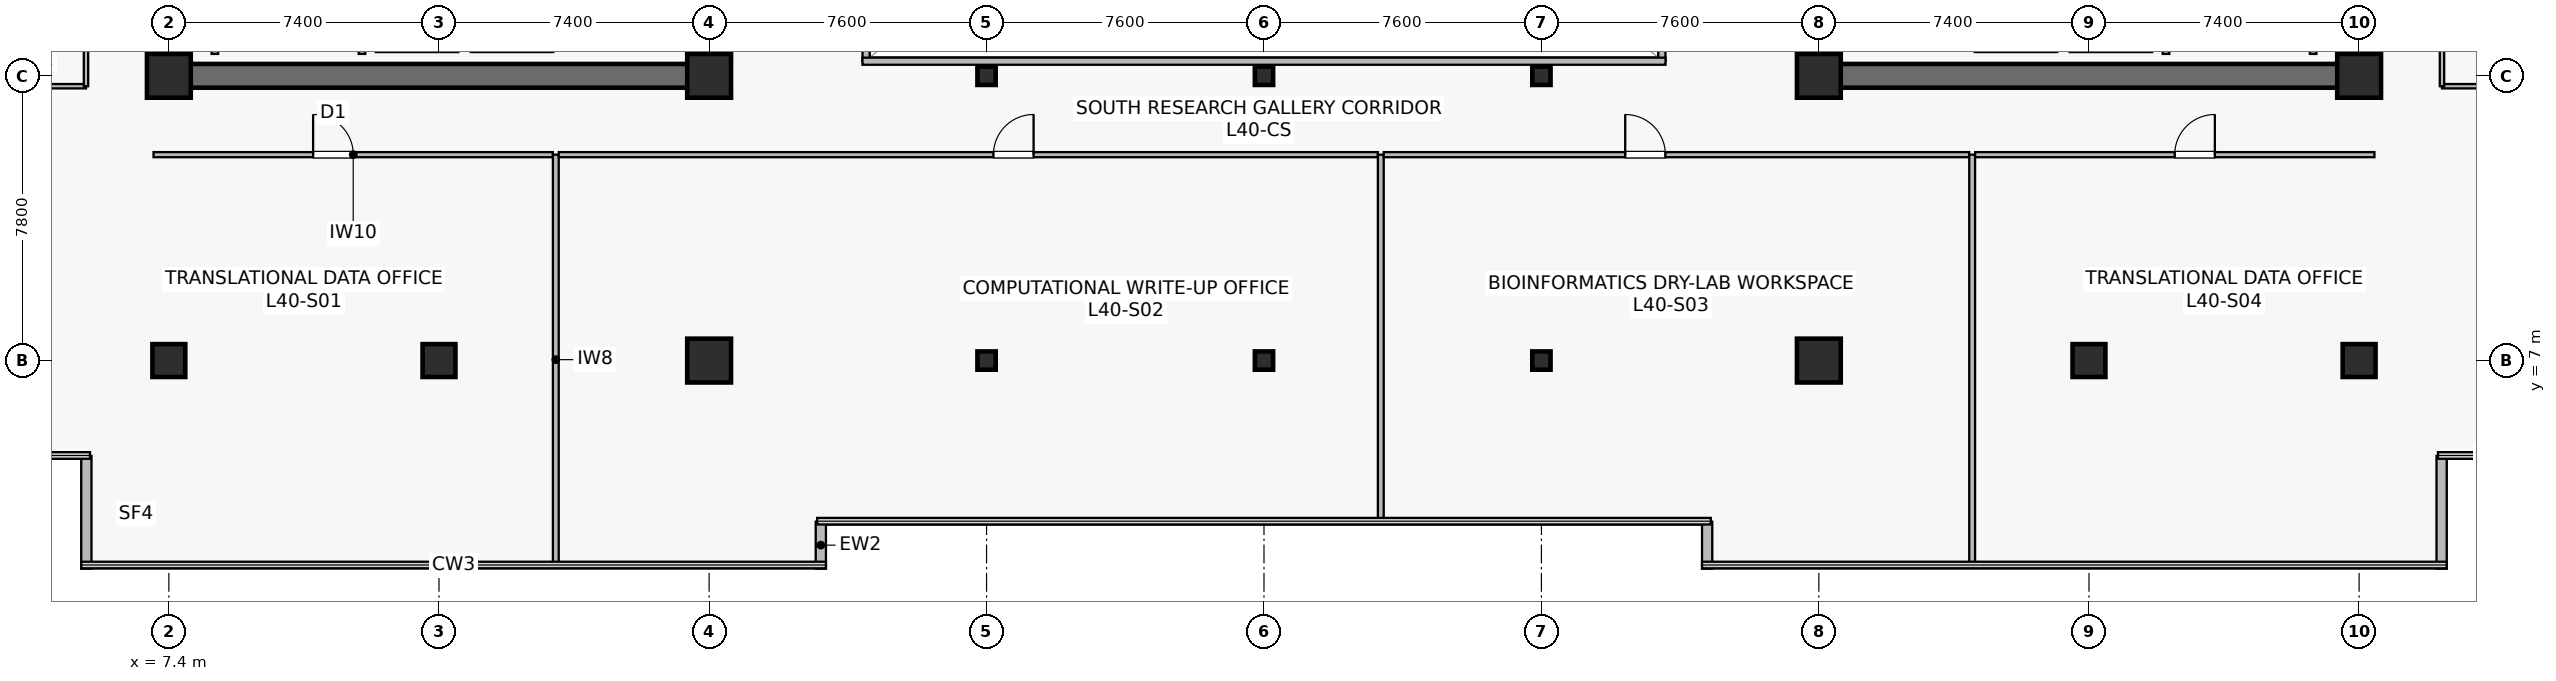
"""IFC4 building model, lengths in metres.
Left out: names, types, materials, properties, quantities, classifications, styles, units other than length and angle.
Written with IfcOpenShell. Run it as: python <this file> out.ifc"""

import sys

from ifc_helpers import new_model, si_unit, direction, frame, frame_2d, origin, origin_2d, place, context, subcontext, project, spatial, rectangle, hollow_rectangle, extrude, source, transform, mapped, element, fill, save


model = new_model("IFC4")
c1 = context("Model", 3, precision=1e-05, world=origin(), true_north=direction((0.0, 1.0)))
c2 = subcontext(c1, "Body", "Model", "MODEL_VIEW")
j1 = project(units=[si_unit("LENGTHUNIT", "METRE"), si_unit("PLANEANGLEUNIT", "RADIAN")], contexts=[c1])
p1 = place(None, origin())
s1 = spatial("IfcSite", under=j1, at=p1, CompositionType="ELEMENT")
p2 = place(p1, origin())
s2 = spatial("IfcBuilding", under=s1, at=p2, CompositionType="ELEMENT")
p3 = place(p2, frame((0.0, 0.0, 166.6)))
s3 = spatial("IfcBuildingStorey", under=s2, at=p3, CompositionType="ELEMENT", Elevation=166.6)
p4 = place(p3, frame((7.075, 14.8, 0.0), z_axis=(0.0, 0.0, 1.0), x_axis=(1.0, 0.0, 0.0)))
e1 = element("IfcWall", 1, at=p4, inside=s3, PredefinedType="SHEAR", context=c2, shape_type="SweptSolid", body=[
    extrude(rectangle(XDim=15.45, YDim=0.65, at=frame_2d((7.725, 0.0))), origin(), (0.0, 0.0, 1.0), 3.79),
])
p5 = place(p3, frame((7.4, 15.125, 0.0), z_axis=(0.0, 0.0, 1.0), x_axis=(0.0, 1.0, 0.0)))
e2 = element("IfcWall", 2, at=p5, inside=s3, PredefinedType="SHEAR", context=c2, shape_type="SweptSolid", body=[
    extrude(rectangle(XDim=18.35, YDim=0.65, at=frame_2d((9.175, 0.0))), origin(), (0.0, 0.0, 1.0), 3.79),
])
p6 = place(p3, frame((22.2, 15.125, 0.0), z_axis=(0.0, 0.0, 1.0), x_axis=(0.0, 1.0, 0.0)))
e3 = element("IfcWall", 3, at=p6, inside=s3, PredefinedType="SHEAR", context=c2, shape_type="SweptSolid", body=[
    extrude(rectangle(XDim=18.35, YDim=0.65, at=frame_2d((9.175, 0.0))), origin(), (0.0, 0.0, 1.0), 3.79),
])
p7 = place(p6, frame((3.425, 0.0, 0.0)))
e4 = element("IfcOpeningElement", 4, at=p7, cuts=e3, PredefinedType="OPENING", context=c2, shape_type="SweptSolid", body=[
    extrude(rectangle(XDim=1.42, YDim=2.2, at=frame_2d((0.71, 1.1))), frame((0.0, 0.335, 0.0), z_axis=(0.0, -1.0, 0.0), x_axis=(1.0, 0.0, 0.0)), (0.0, 0.0, 1.0), 0.67),
])
p8 = place(p3, frame((52.275, 14.8, 0.0), z_axis=(0.0, 0.0, 1.0), x_axis=(1.0, 0.0, 0.0)))
e5 = element("IfcWall", 5, at=p8, inside=s3, PredefinedType="SHEAR", context=c2, shape_type="SweptSolid", body=[
    extrude(rectangle(XDim=15.45, YDim=0.65, at=frame_2d((7.725, 0.0))), origin(), (0.0, 0.0, 1.0), 3.79),
])
p9 = place(p3, frame((52.6, 15.125, 0.0), z_axis=(0.0, 0.0, 1.0), x_axis=(0.0, 1.0, 0.0)))
e6 = element("IfcWall", 6, at=p9, inside=s3, PredefinedType="SHEAR", context=c2, shape_type="SweptSolid", body=[
    extrude(rectangle(XDim=18.35, YDim=0.65, at=frame_2d((9.175, 0.0))), origin(), (0.0, 0.0, 1.0), 3.79),
])
p10 = place(p9, frame((3.425, 0.0, 0.0)))
e7 = element("IfcOpeningElement", 7, at=p10, cuts=e6, PredefinedType="OPENING", context=c2, shape_type="SweptSolid", body=[
    extrude(rectangle(XDim=1.42, YDim=2.2, at=frame_2d((0.71, 1.1))), frame((0.0, 0.335, 0.0), z_axis=(0.0, -1.0, 0.0), x_axis=(1.0, 0.0, 0.0)), (0.0, 0.0, 1.0), 0.67),
])
p11 = place(p3, frame((67.4, 15.125, 0.0), z_axis=(0.0, 0.0, 1.0), x_axis=(0.0, 1.0, 0.0)))
e8 = element("IfcWall", 8, at=p11, inside=s3, PredefinedType="SHEAR", context=c2, shape_type="SweptSolid", body=[
    extrude(rectangle(XDim=18.35, YDim=0.65, at=frame_2d((9.175, 0.0))), origin(), (0.0, 0.0, 1.0), 3.79),
])
m1 = source(origin(), c2, "Body", "SweptSolid", [
    extrude(rectangle(XDim=0.9, YDim=0.9, at=origin_2d()), origin(), (0.0, 0.0, 1.0), 4.1),
])
p12 = place(p3, frame((14.8, 7.0, 0.0), z_axis=(0.0, 0.0, 1.0), x_axis=(1.0, 0.0, 0.0)))
e9 = element("IfcColumn", 9, at=p12, inside=s3, PredefinedType="COLUMN", context=c2, shape_type="MappedRepresentation", body=[
    mapped(m1, transform((0.0, 0.0, 0.0), scale=1.0)),
])
m2 = source(origin(), c2, "Body", "SweptSolid", [
    extrude(rectangle(XDim=1.2, YDim=1.2, at=origin_2d()), origin(), (0.0, 0.0, 1.0), 4.1),
])
for number, where, z_axis, x_axis in (
    (10, (22.2, 7.0, 0.0), (0.0, 0.0, 1.0), (1.0, 0.0, 0.0)),
    (11, (7.4, 14.8, 0.0), (0.0, 0.0, 1.0), (1.0, 0.0, 0.0)),
    (12, (22.2, 14.8, 0.0), (0.0, 0.0, 1.0), (1.0, 0.0, 0.0)),
    (13, (52.6, 7.0, 0.0), (0.0, 0.0, 1.0), (1.0, 0.0, 0.0)),
):
    element("IfcColumn", number, at=place(p3, frame(where, z_axis=z_axis, x_axis=x_axis)), inside=s3, PredefinedType="COLUMN", context=c2, shape_type="MappedRepresentation", body=[
        mapped(m2, transform((0.0, 0.0, 0.0), scale=1.0)),
    ])
p13 = place(p3, frame((60.0, 7.0, 0.0), z_axis=(0.0, 0.0, 1.0), x_axis=(1.0, 0.0, 0.0)))
e14 = element("IfcColumn", 14, at=p13, inside=s3, PredefinedType="COLUMN", context=c2, shape_type="MappedRepresentation", body=[
    mapped(m1, transform((0.0, 0.0, 0.0), scale=1.0)),
])
for number, where, z_axis, x_axis in (
    (15, (52.6, 14.8, 0.0), (0.0, 0.0, 1.0), (1.0, 0.0, 0.0)),
    (16, (67.4, 14.8, 0.0), (0.0, 0.0, 1.0), (1.0, 0.0, 0.0)),
):
    element("IfcColumn", number, at=place(p3, frame(where, z_axis=z_axis, x_axis=x_axis)), inside=s3, PredefinedType="COLUMN", context=c2, shape_type="MappedRepresentation", body=[
        mapped(m2, transform((0.0, 0.0, 0.0), scale=1.0)),
    ])
for number, where, z_axis, x_axis in (
    (17, (7.4, 7.0, 0.0), (0.0, 0.0, 1.0), (1.0, 0.0, 0.0)),
    (18, (67.4, 7.0, 0.0), (0.0, 0.0, 1.0), (1.0, 0.0, 0.0)),
):
    element("IfcColumn", number, at=place(p3, frame(where, z_axis=z_axis, x_axis=x_axis)), inside=s3, PredefinedType="COLUMN", context=c2, shape_type="MappedRepresentation", body=[
        mapped(m1, transform((0.0, 0.0, 0.0), scale=1.0)),
    ])
m3 = source(origin(), c2, "Body", "SweptSolid", [
    extrude(hollow_rectangle(XDim=0.5, YDim=0.5, WallThickness=0.022, at=origin_2d()), origin(), (0.0, 0.0, 1.0), 4.1),
])
for number, where, z_axis, x_axis in (
    (19, (29.8, 7.0, 0.0), (0.0, 0.0, 1.0), (1.0, 0.0, 0.0)),
    (20, (29.8, 14.8, 0.0), (0.0, 0.0, 1.0), (1.0, 0.0, 0.0)),
    (21, (37.4, 7.0, 0.0), (0.0, 0.0, 1.0), (1.0, 0.0, 0.0)),
    (22, (37.4, 14.8, 0.0), (0.0, 0.0, 1.0), (1.0, 0.0, 0.0)),
    (23, (45.0, 7.0, 0.0), (0.0, 0.0, 1.0), (1.0, 0.0, 0.0)),
    (24, (45.0, 14.8, 0.0), (0.0, 0.0, 1.0), (1.0, 0.0, 0.0)),
):
    element("IfcColumn", number, at=place(p3, frame(where, z_axis=z_axis, x_axis=x_axis)), inside=s3, PredefinedType="COLUMN", context=c2, shape_type="MappedRepresentation", body=[
        mapped(m3, transform((0.0, 0.0, 0.0), scale=1.0)),
    ])
for number, where, z_axis, x_axis in (
    (25, (25.26, 1.3, 0.0), (0.0, 0.0, 1.0), (0.0, 1.0, 0.0)),
    (26, (49.54, 2.588, 0.0), (0.0, 0.0, 1.0), (0.0, -1.0, 0.0)),
):
    element("IfcWall", number, at=place(p3, frame(where, z_axis=z_axis, x_axis=x_axis)), inside=s3, PredefinedType="STANDARD", context=c2, shape_type="SweptSolid", body=[
        extrude(rectangle(XDim=1.288, YDim=0.28, at=frame_2d((0.644, 0.0))), origin(), (0.0, 0.0, 1.0), 3.79),
    ])
for number, where, z_axis, x_axis in (
    (27, (69.66, 1.3, 0.0), (0.0, 0.0, 1.0), (0.0, 1.0, 0.0)),
    (28, (5.14, 4.388, 0.0), (0.0, 0.0, 1.0), (0.0, -1.0, 0.0)),
):
    element("IfcWall", number, at=place(p3, frame(where, z_axis=z_axis, x_axis=x_axis)), inside=s3, PredefinedType="STANDARD", context=c2, shape_type="SweptSolid", body=[
        extrude(rectangle(XDim=3.088, YDim=0.28, at=frame_2d((1.544, 0.0))), origin(), (0.0, 0.0, 1.0), 3.79),
    ])
p14 = place(p3, frame((13.07, 15.55, 0.0), z_axis=(0.0, 0.0, 1.0), x_axis=(1.0, 0.0, 0.0)))
e29 = element("IfcWall", 29, at=p14, inside=s3, PredefinedType="SOLIDWALL", context=c2, shape_type="SweptSolid", body=[
    extrude(rectangle(XDim=2.26, YDim=0.2, at=frame_2d((1.13, 0.0))), origin(), (0.0, 0.0, 1.0), 3.187),
])
p15 = place(p3, frame((15.67, 15.55, 0.0), z_axis=(0.0, 0.0, 1.0), x_axis=(1.0, 0.0, 0.0)))
e30 = element("IfcWall", 30, at=p15, inside=s3, PredefinedType="SOLIDWALL", context=c2, shape_type="SweptSolid", body=[
    extrude(rectangle(XDim=2.26, YDim=0.2, at=frame_2d((1.13, 0.0))), origin(), (0.0, 0.0, 1.0), 3.79),
])
for number, where, z_axis, x_axis in (
    (31, (12.69, 15.4, 0.0), (0.0, 0.0, 1.0), (0.0, 1.0, 0.0)),
    (32, (8.66, 15.4, 0.0), (0.0, 0.0, 1.0), (0.0, 1.0, 0.0)),
):
    element("IfcWall", number, at=place(p3, frame(where, z_axis=z_axis, x_axis=x_axis)), inside=s3, PredefinedType="SOLIDWALL", context=c2, shape_type="SweptSolid", body=[
        extrude(rectangle(XDim=2.4, YDim=0.18, at=frame_2d((1.2, 0.0))), origin(), (0.0, 0.0, 1.0), 3.79),
    ])
p16 = place(p3, frame((59.47, 15.55, 0.0), z_axis=(0.0, 0.0, 1.0), x_axis=(1.0, 0.0, 0.0)))
e33 = element("IfcWall", 33, at=p16, inside=s3, PredefinedType="SOLIDWALL", context=c2, shape_type="SweptSolid", body=[
    extrude(rectangle(XDim=2.26, YDim=0.2, at=frame_2d((1.13, 0.0))), origin(), (0.0, 0.0, 1.0), 3.187),
])
p17 = place(p3, frame((56.87, 15.55, 0.0), z_axis=(0.0, 0.0, 1.0), x_axis=(1.0, 0.0, 0.0)))
e34 = element("IfcWall", 34, at=p17, inside=s3, PredefinedType="SOLIDWALL", context=c2, shape_type="SweptSolid", body=[
    extrude(rectangle(XDim=2.26, YDim=0.2, at=frame_2d((1.13, 0.0))), origin(), (0.0, 0.0, 1.0), 3.79),
])
for number, where, z_axis, x_axis in (
    (35, (62.11, 15.4, 0.0), (0.0, 0.0, 1.0), (0.0, 1.0, 0.0)),
    (36, (66.14, 15.4, 0.0), (0.0, 0.0, 1.0), (0.0, 1.0, 0.0)),
):
    element("IfcWall", number, at=place(p3, frame(where, z_axis=z_axis, x_axis=x_axis)), inside=s3, PredefinedType="SOLIDWALL", context=c2, shape_type="SweptSolid", body=[
        extrude(rectangle(XDim=2.4, YDim=0.18, at=frame_2d((1.2, 0.0))), origin(), (0.0, 0.0, 1.0), 3.79),
    ])
p18 = place(p3, frame((26.5, 15.2, 0.0), z_axis=(0.0, 0.0, 1.0), x_axis=(0.0, 1.0, 0.0)))
e37 = element("IfcWall", 37, at=p18, inside=s3, PredefinedType="SOLIDWALL", context=c2, shape_type="SweptSolid", body=[
    extrude(rectangle(XDim=18.2, YDim=0.195, at=frame_2d((9.1, 0.0))), origin(), (0.0, 0.0, 1.0), 3.79),
])
p19 = place(p18, frame((1.8, 0.0, 0.9)))
e38 = element("IfcOpeningElement", 38, at=p19, cuts=e37, PredefinedType="OPENING", context=c2, shape_type="SweptSolid", body=[
    extrude(rectangle(XDim=1.5, YDim=1.4, at=frame_2d((0.75, 0.7))), frame((0.0, 0.107, 0.0), z_axis=(0.0, -1.0, 0.0), x_axis=(1.0, 0.0, 0.0)), (0.0, 0.0, 1.0), 0.215),
])
p20 = place(p18, frame((13.2, 0.0, 0.9)))
e39 = element("IfcOpeningElement", 39, at=p20, cuts=e37, PredefinedType="OPENING", context=c2, shape_type="SweptSolid", body=[
    extrude(rectangle(XDim=1.5, YDim=1.4, at=frame_2d((0.75, 0.7))), frame((0.0, 0.107, 0.0), z_axis=(0.0, -1.0, 0.0), x_axis=(1.0, 0.0, 0.0)), (0.0, 0.0, 1.0), 0.215),
])
p21 = place(p3, frame((48.3, 15.2, 0.0), z_axis=(0.0, 0.0, 1.0), x_axis=(0.0, 1.0, 0.0)))
e40 = element("IfcWall", 40, at=p21, inside=s3, PredefinedType="SOLIDWALL", context=c2, shape_type="SweptSolid", body=[
    extrude(rectangle(XDim=18.2, YDim=0.195, at=frame_2d((9.1, 0.0))), origin(), (0.0, 0.0, 1.0), 3.79),
])
p22 = place(p21, frame((1.8, 0.0, 0.9)))
e41 = element("IfcOpeningElement", 41, at=p22, cuts=e40, PredefinedType="OPENING", context=c2, shape_type="SweptSolid", body=[
    extrude(rectangle(XDim=1.5, YDim=1.4, at=frame_2d((0.75, 0.7))), frame((0.0, 0.107, 0.0), z_axis=(0.0, -1.0, 0.0), x_axis=(1.0, 0.0, 0.0)), (0.0, 0.0, 1.0), 0.215),
])
p23 = place(p21, frame((13.2, 0.0, 0.9)))
e42 = element("IfcOpeningElement", 42, at=p23, cuts=e40, PredefinedType="OPENING", context=c2, shape_type="SweptSolid", body=[
    extrude(rectangle(XDim=1.5, YDim=1.4, at=frame_2d((0.75, 0.7))), frame((0.0, 0.107, 0.0), z_axis=(0.0, -1.0, 0.0), x_axis=(1.0, 0.0, 0.0)), (0.0, 0.0, 1.0), 0.215),
])
p24 = place(p3, frame((26.4, 15.2, 0.0), z_axis=(0.0, 0.0, 1.0), x_axis=(1.0, 0.0, 0.0)))
e43 = element("IfcWall", 43, at=p24, inside=s3, PredefinedType="SOLIDWALL", context=c2, shape_type="SweptSolid", body=[
    extrude(rectangle(XDim=22.0, YDim=0.195, at=frame_2d((11.0, 0.0))), origin(), (0.0, 0.0, 1.0), 3.79),
])
p25 = place(p3, frame((6.98, 12.64, 0.0), z_axis=(0.0, 0.0, 1.0), x_axis=(1.0, 0.0, 0.0)))
e44 = element("IfcWall", 44, at=p25, inside=s3, PredefinedType="PARTITIONING", context=c2, shape_type="SweptSolid", body=[
    extrude(rectangle(XDim=10.94, YDim=0.14, at=frame_2d((5.47, 0.0))), origin(), (0.0, 0.0, 1.0), 3.187),
])
p26 = place(p25, frame((4.372, 0.0, 0.0)))
e45 = element("IfcOpeningElement", 45, at=p26, cuts=e44, PredefinedType="OPENING", context=c2, shape_type="SweptSolid", body=[
    extrude(rectangle(XDim=1.1, YDim=2.18, at=frame_2d((0.55, 1.09))), frame((0.0, 0.08, 0.0), z_axis=(0.0, -1.0, 0.0), x_axis=(1.0, 0.0, 0.0)), (0.0, 0.0, 1.0), 0.16),
])
p27 = place(p3, frame((18.0, 1.41, 0.0), z_axis=(0.0, 0.0, 1.0), x_axis=(0.0, 1.0, 0.0)))
e46 = element("IfcWall", 46, at=p27, inside=s3, PredefinedType="PARTITIONING", context=c2, shape_type="SweptSolid", body=[
    extrude(rectangle(XDim=11.23, YDim=0.16, at=frame_2d((5.615, 0.0))), origin(), (0.0, 0.0, 1.0), 3.075),
])
p28 = place(p3, frame((18.08, 12.64, 0.0), z_axis=(0.0, 0.0, 1.0), x_axis=(1.0, 0.0, 0.0)))
e47 = element("IfcWall", 47, at=p28, inside=s3, PredefinedType="PARTITIONING", context=c2, shape_type="SweptSolid", body=[
    extrude(rectangle(XDim=22.44, YDim=0.14, at=frame_2d((11.22, 0.0))), origin(), (0.0, 0.0, 1.0), 3.187),
])
p29 = place(p28, frame((11.908, 0.0, 0.0)))
e48 = element("IfcOpeningElement", 48, at=p29, cuts=e47, PredefinedType="OPENING", context=c2, shape_type="SweptSolid", body=[
    extrude(rectangle(XDim=1.1, YDim=2.18, at=frame_2d((0.55, 1.09))), frame((0.0, 0.08, 0.0), z_axis=(0.0, -1.0, 0.0), x_axis=(1.0, 0.0, 0.0)), (0.0, 0.0, 1.0), 0.16),
])
p30 = place(p3, frame((40.6, 2.61, 0.0), z_axis=(0.0, 0.0, 1.0), x_axis=(0.0, 1.0, 0.0)))
e49 = element("IfcWall", 49, at=p30, inside=s3, PredefinedType="PARTITIONING", context=c2, shape_type="SweptSolid", body=[
    extrude(rectangle(XDim=10.03, YDim=0.16, at=frame_2d((5.015, 0.0))), origin(), (0.0, 0.0, 1.0), 3.075),
])
p31 = place(p3, frame((40.68, 12.64, 0.0), z_axis=(0.0, 0.0, 1.0), x_axis=(1.0, 0.0, 0.0)))
e50 = element("IfcWall", 50, at=p31, inside=s3, PredefinedType="PARTITIONING", context=c2, shape_type="SweptSolid", body=[
    extrude(rectangle(XDim=16.04, YDim=0.14, at=frame_2d((8.02, 0.0))), origin(), (0.0, 0.0, 1.0), 3.187),
])
p32 = place(p31, frame((6.615, 0.0, 0.0)))
e51 = element("IfcOpeningElement", 51, at=p32, cuts=e50, PredefinedType="OPENING", context=c2, shape_type="SweptSolid", body=[
    extrude(rectangle(XDim=1.1, YDim=2.18, at=frame_2d((0.55, 1.09))), frame((0.0, 0.08, 0.0), z_axis=(0.0, -1.0, 0.0), x_axis=(1.0, 0.0, 0.0)), (0.0, 0.0, 1.0), 0.16),
])
p33 = place(p3, frame((56.8, 1.41, 0.0), z_axis=(0.0, 0.0, 1.0), x_axis=(0.0, 1.0, 0.0)))
e52 = element("IfcWall", 52, at=p33, inside=s3, PredefinedType="PARTITIONING", context=c2, shape_type="SweptSolid", body=[
    extrude(rectangle(XDim=11.23, YDim=0.16, at=frame_2d((5.615, 0.0))), origin(), (0.0, 0.0, 1.0), 3.075),
])
p34 = place(p3, frame((56.88, 12.64, 0.0), z_axis=(0.0, 0.0, 1.0), x_axis=(1.0, 0.0, 0.0)))
e53 = element("IfcWall", 53, at=p34, inside=s3, PredefinedType="PARTITIONING", context=c2, shape_type="SweptSolid", body=[
    extrude(rectangle(XDim=10.94, YDim=0.14, at=frame_2d((5.47, 0.0))), origin(), (0.0, 0.0, 1.0), 3.187),
])
p35 = place(p34, frame((5.469, 0.0, 0.0)))
e54 = element("IfcOpeningElement", 54, at=p35, cuts=e53, PredefinedType="OPENING", context=c2, shape_type="SweptSolid", body=[
    extrude(rectangle(XDim=1.1, YDim=2.18, at=frame_2d((0.55, 1.09))), frame((0.0, 0.08, 0.0), z_axis=(0.0, -1.0, 0.0), x_axis=(1.0, 0.0, 0.0)), (0.0, 0.0, 1.0), 0.16),
])
p36 = place(p3, frame((2.11, 14.515, 0.0), z_axis=(0.0, 0.0, 1.0), x_axis=(1.0, 0.0, 0.0)))
e55 = element("IfcWall", 55, at=p36, inside=s3, PredefinedType="PARTITIONING", context=c2, shape_type="SweptSolid", body=[
    extrude(rectangle(XDim=3.02, YDim=0.12, at=frame_2d((1.51, 0.0))), origin(), (0.0, 0.0, 1.0), 3.79),
])
p37 = place(p3, frame((5.13, 14.515, 0.0), z_axis=(0.0, 0.0, 1.0), x_axis=(0.0, 1.0, 0.0)))
e56 = element("IfcWall", 56, at=p37, inside=s3, PredefinedType="PARTITIONING", context=c2, shape_type="SweptSolid", body=[
    extrude(rectangle(XDim=9.625, YDim=0.12, at=frame_2d((4.812, 0.0))), origin(), (0.0, 0.0, 1.0), 3.79),
])
p38 = place(p37, frame((4.363, 0.0, 0.0)))
e57 = element("IfcOpeningElement", 57, at=p38, cuts=e56, PredefinedType="OPENING", context=c2, shape_type="SweptSolid", body=[
    extrude(rectangle(XDim=0.9, YDim=2.1, at=frame_2d((0.45, 1.05))), frame((0.0, 0.07, 0.0), z_axis=(0.0, -1.0, 0.0), x_axis=(1.0, 0.0, 0.0)), (0.0, 0.0, 1.0), 0.14),
])
p39 = place(p3, frame((69.67, 14.515, 0.0), z_axis=(0.0, 0.0, 1.0), x_axis=(1.0, 0.0, 0.0)))
e58 = element("IfcWall", 58, at=p39, inside=s3, PredefinedType="PARTITIONING", context=c2, shape_type="SweptSolid", body=[
    extrude(rectangle(XDim=3.02, YDim=0.12, at=frame_2d((1.51, 0.0))), origin(), (0.0, 0.0, 1.0), 3.79),
])
p40 = place(p3, frame((69.67, 14.515, 0.0), z_axis=(0.0, 0.0, 1.0), x_axis=(0.0, 1.0, 0.0)))
e59 = element("IfcWall", 59, at=p40, inside=s3, PredefinedType="PARTITIONING", context=c2, shape_type="SweptSolid", body=[
    extrude(rectangle(XDim=5.825, YDim=0.12, at=frame_2d((2.913, 0.0))), origin(), (0.0, 0.0, 1.0), 3.79),
])
p41 = place(p40, frame((2.462, 0.0, 0.0)))
e60 = element("IfcOpeningElement", 60, at=p41, cuts=e59, PredefinedType="OPENING", context=c2, shape_type="SweptSolid", body=[
    extrude(rectangle(XDim=0.9, YDim=2.1, at=frame_2d((0.45, 1.05))), frame((0.0, 0.07, 0.0), z_axis=(0.0, -1.0, 0.0), x_axis=(1.0, 0.0, 0.0)), (0.0, 0.0, 1.0), 0.14),
])
m4 = source(origin(), c2, "Body", "SweptSolid", [
    extrude(rectangle(XDim=1.1, YDim=2.18, at=frame_2d((0.55, 1.09))), frame((0.0, 0.025, 0.0), z_axis=(0.0, -1.0, 0.0), x_axis=(1.0, 0.0, 0.0)), (0.0, 0.0, 1.0), 0.05),
])
p42 = place(p26, origin())
e61 = element("IfcDoor", 61, at=p42, inside=s3, OperationType="SINGLE_SWING_LEFT", PredefinedType="DOOR", context=c2, shape_type="MappedRepresentation", body=[
    mapped(m4, transform((0.0, 0.0, 0.0), scale=1.0)),
])
fill(e45, e61)
p43 = place(p29, origin())
e62 = element("IfcDoor", 62, at=p43, inside=s3, OperationType="SINGLE_SWING_RIGHT", PredefinedType="DOOR", context=c2, shape_type="MappedRepresentation", body=[
    mapped(m4, transform((0.0, 0.0, 0.0), scale=1.0)),
])
fill(e48, e62)
p44 = place(p32, origin())
e63 = element("IfcDoor", 63, at=p44, inside=s3, OperationType="SINGLE_SWING_LEFT", PredefinedType="DOOR", context=c2, shape_type="MappedRepresentation", body=[
    mapped(m4, transform((0.0, 0.0, 0.0), scale=1.0)),
])
fill(e51, e63)
p45 = place(p35, origin())
e64 = element("IfcDoor", 64, at=p45, inside=s3, OperationType="SINGLE_SWING_RIGHT", PredefinedType="DOOR", context=c2, shape_type="MappedRepresentation", body=[
    mapped(m4, transform((0.0, 0.0, 0.0), scale=1.0)),
])
fill(e54, e64)
save(model, sys.argv[1])
